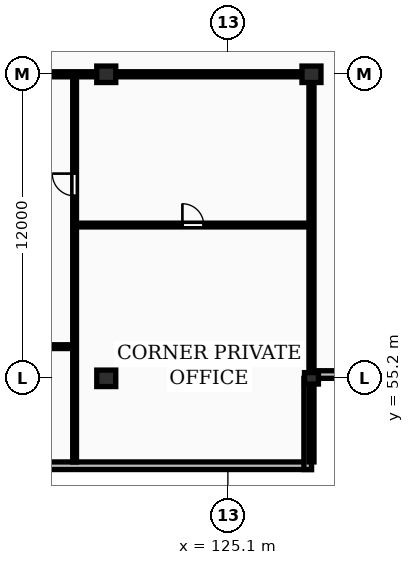
"""IFC4 building model, lengths in metres.
Left out: names, types, materials, properties, quantities, classifications, styles, units other than length and angle.
Written with IfcOpenShell. Run it as: python <this file> out.ifc"""

import sys

from ifc_helpers import new_model, si_unit, direction, frame, frame_2d, origin, origin_2d, place, context, subcontext, project, spatial, rectangle, extrude, element, fill, save


model = new_model("IFC4")
c1 = context("Model", 3, precision=1e-05, world=origin(), true_north=direction((0.0, 1.0)))
c2 = subcontext(c1, "Body", "Model", "MODEL_VIEW")
j1 = project(units=[si_unit("LENGTHUNIT", "METRE"), si_unit("PLANEANGLEUNIT", "RADIAN")], contexts=[c1])
p1 = place(None, origin())
s1 = spatial("IfcSite", under=j1, at=p1, CompositionType="ELEMENT")
p2 = place(p1, origin())
s2 = spatial("IfcBuilding", under=s1, at=p2, CompositionType="ELEMENT")
p3 = place(p2, frame((0.0, 0.0, 235.55)))
s3 = spatial("IfcBuildingStorey", under=s2, at=p3, CompositionType="ELEMENT", Elevation=235.55)
for number, where, z_axis, x_axis in (
    (1, (120.3, 55.2, 0.0), (0.0, 0.0, 1.0), (1.0, 0.0, 0.0)),
    (2, (120.3, 67.2, 0.0), (0.0, 0.0, 1.0), (1.0, 0.0, 0.0)),
):
    element("IfcColumn", number, at=place(p3, frame(where, z_axis=z_axis, x_axis=x_axis)), inside=s3, PredefinedType="COLUMN", context=c2, shape_type="SweptSolid", body=[
        extrude(rectangle(XDim=0.75, YDim=0.65, at=origin_2d()), origin(), (0.0, 0.0, 1.0), 3.45),
    ])
p4 = place(p3, frame((128.4, 55.2, 0.0), z_axis=(0.0, 0.0, 1.0), x_axis=(1.0, 0.0, 0.0)))
e3 = element("IfcColumn", 3, at=p4, inside=s3, PredefinedType="PILASTER", context=c2, shape_type="SweptSolid", body=[
    extrude(rectangle(XDim=0.55, YDim=0.45, at=origin_2d()), origin(), (0.0, 0.0, 1.0), 3.45),
])
p5 = place(p3, frame((128.4, 67.2, 0.0), z_axis=(0.0, 0.0, 1.0), x_axis=(1.0, 0.0, 0.0)))
e4 = element("IfcColumn", 4, at=p5, inside=s3, PredefinedType="COLUMN", context=c2, shape_type="SweptSolid", body=[
    extrude(rectangle(XDim=0.75, YDim=0.65, at=origin_2d()), origin(), (0.0, 0.0, 1.0), 3.45),
])
p6 = place(p3, frame((59.8, 51.75, 0.0), z_axis=(0.0, 0.0, 1.0), x_axis=(1.0, 0.0, 0.0)))
e5 = element("IfcWall", 5, at=p6, inside=s3, PredefinedType="STANDARD", context=c2, shape_type="SweptSolid", body=[
    extrude(rectangle(XDim=68.6, YDim=0.3, at=frame_2d((34.3, 0.0))), origin(), (0.0, 0.0, 1.0), 3.17),
])
p7 = place(p6, frame((13.025, 0.0, 0.85)))
e6 = element("IfcOpeningElement", 6, at=p7, cuts=e5, PredefinedType="OPENING", context=c2, shape_type="SweptSolid", body=[
    extrude(rectangle(XDim=1.8, YDim=1.8, at=frame_2d((0.9, 0.9))), frame((0.0, 0.16, 0.0), z_axis=(0.0, -1.0, 0.0), x_axis=(1.0, 0.0, 0.0)), (0.0, 0.0, 1.0), 0.32),
])
p8 = place(p6, frame((56.375, 0.0, 0.85)))
e7 = element("IfcOpeningElement", 7, at=p8, cuts=e5, PredefinedType="OPENING", context=c2, shape_type="SweptSolid", body=[
    extrude(rectangle(XDim=1.8, YDim=1.8, at=frame_2d((0.9, 0.9))), frame((0.0, 0.16, 0.0), z_axis=(0.0, -1.0, 0.0), x_axis=(1.0, 0.0, 0.0)), (0.0, 0.0, 1.0), 0.32),
])
p9 = place(p3, frame((128.25, 51.6, 0.0), z_axis=(0.0, 0.0, 1.0), x_axis=(0.0, 1.0, 0.0)))
e8 = element("IfcWall", 8, at=p9, inside=s3, PredefinedType="STANDARD", context=c2, shape_type="SweptSolid", body=[
    extrude(rectangle(XDim=3.6, YDim=0.3, at=frame_2d((1.8, 0.0))), origin(), (0.0, 0.0, 1.0), 3.17),
])
p10 = place(p3, frame((128.4, 55.35, 0.0), z_axis=(0.0, 0.0, 1.0), x_axis=(1.0, 0.0, 0.0)))
e9 = element("IfcWall", 9, at=p10, inside=s3, PredefinedType="STANDARD", context=c2, shape_type="SweptSolid", body=[
    extrude(rectangle(XDim=3.6, YDim=0.3, at=frame_2d((1.8, 0.0))), origin(), (0.0, 0.0, 1.0), 3.17),
])
p11 = place(p3, frame((128.4, 51.9, 0.0), z_axis=(0.0, 0.0, 1.0), x_axis=(0.0, 1.0, 0.0)))
e10 = element("IfcWall", 10, at=p11, inside=s3, PredefinedType="PARTITIONING", context=c2, shape_type="SweptSolid", body=[
    extrude(rectangle(XDim=15.3, YDim=0.2, at=frame_2d((7.65, 0.0))), origin(), (0.0, 0.0, 1.0), 2.477),
])
p12 = place(p3, frame((119.05, 61.25, 0.0), z_axis=(0.0, 0.0, 1.0), x_axis=(1.0, 0.0, 0.0)))
e11 = element("IfcWall", 11, at=p12, inside=s3, PredefinedType="PARTITIONING", context=c2, shape_type="SweptSolid", body=[
    extrude(rectangle(XDim=9.35, YDim=0.15, at=frame_2d((4.675, 0.0))), origin(), (0.0, 0.0, 1.0), 3.17),
])
p13 = place(p12, frame((4.255, 0.0, 0.0)))
e12 = element("IfcOpeningElement", 12, at=p13, cuts=e11, PredefinedType="OPENING", context=c2, shape_type="SweptSolid", body=[
    extrude(rectangle(XDim=0.84, YDim=2.04, at=frame_2d((0.42, 1.02))), frame((0.0, 0.085, 0.0), z_axis=(0.0, -1.0, 0.0), x_axis=(1.0, 0.0, 0.0)), (0.0, 0.0, 1.0), 0.17),
])
p14 = place(p3, frame((119.05, 51.9, 0.0), z_axis=(0.0, 0.0, 1.0), x_axis=(0.0, 1.0, 0.0)))
e13 = element("IfcWall", 13, at=p14, inside=s3, PredefinedType="PARTITIONING", context=c2, shape_type="SweptSolid", body=[
    extrude(rectangle(XDim=15.25, YDim=0.15, at=frame_2d((7.625, 0.0))), origin(), (0.0, 0.0, 1.0), 3.17),
])
p15 = place(p14, frame((10.5, 0.0, 0.0)))
e14 = element("IfcOpeningElement", 14, at=p15, cuts=e13, PredefinedType="OPENING", context=c2, shape_type="SweptSolid", body=[
    extrude(rectangle(XDim=0.88, YDim=2.06, at=frame_2d((0.44, 1.03))), frame((0.0, 0.085, 0.0), z_axis=(0.0, -1.0, 0.0), x_axis=(1.0, 0.0, 0.0)), (0.0, 0.0, 1.0), 0.17),
])
p16 = place(p3, frame((112.27, 56.45, 0.0), z_axis=(0.0, 0.0, 1.0), x_axis=(1.0, 0.0, 0.0)))
e15 = element("IfcWall", 15, at=p16, inside=s3, PredefinedType="PARTITIONING", context=c2, shape_type="SweptSolid", body=[
    extrude(rectangle(XDim=6.76, YDim=0.15, at=frame_2d((3.38, 0.0))), origin(), (0.0, 0.0, 1.0), 3.17),
])
p17 = place(p16, frame((1.64, 0.0, 0.0)))
e16 = element("IfcOpeningElement", 16, at=p17, cuts=e15, PredefinedType="OPENING", context=c2, shape_type="SweptSolid", body=[
    extrude(rectangle(XDim=0.84, YDim=2.04, at=frame_2d((0.42, 1.02))), frame((0.0, 0.085, 0.0), z_axis=(0.0, -1.0, 0.0), x_axis=(1.0, 0.0, 0.0)), (0.0, 0.0, 1.0), 0.17),
])
p18 = place(p16, frame((3.16, 0.0, 0.0)))
e17 = element("IfcOpeningElement", 17, at=p18, cuts=e15, PredefinedType="OPENING", context=c2, shape_type="SweptSolid", body=[
    extrude(rectangle(XDim=0.88, YDim=2.06, at=frame_2d((0.44, 1.03))), frame((0.0, 0.085, 0.0), z_axis=(0.0, -1.0, 0.0), x_axis=(1.0, 0.0, 0.0)), (0.0, 0.0, 1.0), 0.17),
])
p19 = place(p3, frame((112.25, 67.2, 0.0), z_axis=(0.0, 0.0, 1.0), x_axis=(1.0, 0.0, 0.0)))
e18 = element("IfcWall", 18, at=p19, inside=s3, PredefinedType="PARTITIONING", context=c2, shape_type="SweptSolid", body=[
    extrude(rectangle(XDim=16.15, YDim=0.2, at=frame_2d((8.075, 0.0))), origin(), (0.0, 0.0, 1.0), 2.633),
])
p20 = place(p19, frame((1.58, 0.0, 0.0)))
e19 = element("IfcOpeningElement", 19, at=p20, cuts=e18, PredefinedType="OPENING", context=c2, shape_type="SweptSolid", body=[
    extrude(rectangle(XDim=0.95, YDim=2.15, at=frame_2d((0.475, 1.075))), frame((0.0, 0.11, 0.0), z_axis=(0.0, -1.0, 0.0), x_axis=(1.0, 0.0, 0.0)), (0.0, 0.0, 1.0), 0.22),
])
p21 = place(p13, origin())
e20 = element("IfcDoor", 20, at=p21, inside=s3, OperationType="SINGLE_SWING_LEFT", PredefinedType="DOOR", context=c2, shape_type="SweptSolid", body=[
    extrude(rectangle(XDim=0.84, YDim=2.04, at=frame_2d((0.42, 1.02))), frame((0.0, 0.025, 0.0), z_axis=(0.0, -1.0, 0.0), x_axis=(1.0, 0.0, 0.0)), (0.0, 0.0, 1.0), 0.05),
])
fill(e12, e20)
p22 = place(p15, origin())
e21 = element("IfcDoor", 21, at=p22, inside=s3, OperationType="SINGLE_SWING_RIGHT", PredefinedType="DOOR", context=c2, shape_type="SweptSolid", body=[
    extrude(rectangle(XDim=0.88, YDim=2.06, at=frame_2d((0.44, 1.03))), frame((0.0, 0.025, 0.0), z_axis=(0.0, -1.0, 0.0), x_axis=(1.0, 0.0, 0.0)), (0.0, 0.0, 1.0), 0.05),
])
fill(e14, e21)
save(model, sys.argv[1])
